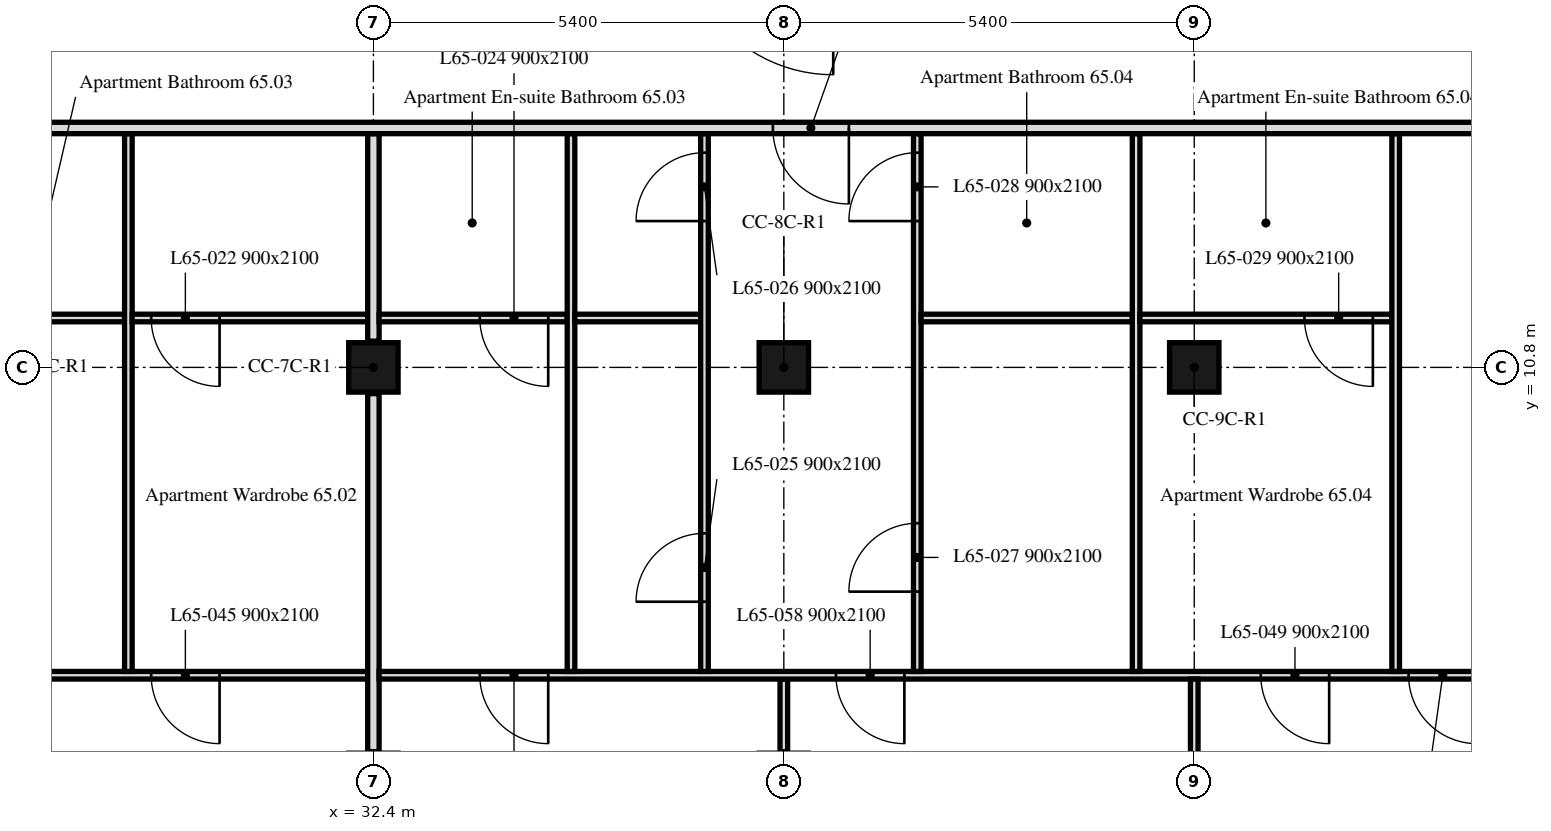
"""IFC4 building model, lengths in metres.
Left out: names, types, materials, properties, quantities, classifications, styles, units other than length and angle.
Written with IfcOpenShell. Run it as: python <this file> out.ifc"""

import sys

from ifc_helpers import new_model, si_unit, direction, frame, frame_2d, origin, origin_2d, place, context, subcontext, project, spatial, rectangle, extrude, element, fill, save


model = new_model("IFC4")
c1 = context("Model", 3, precision=1e-05, world=origin(), true_north=direction((0.0, 1.0)))
c2 = subcontext(c1, "Body", "Model", "MODEL_VIEW")
j1 = project(units=[si_unit("LENGTHUNIT", "METRE"), si_unit("PLANEANGLEUNIT", "RADIAN")], contexts=[c1])
p1 = place(None, origin())
s1 = spatial("IfcSite", under=j1, at=p1, CompositionType="ELEMENT")
p2 = place(p1, origin())
s2 = spatial("IfcBuilding", under=s1, at=p2, CompositionType="ELEMENT")
p3 = place(p2, frame((0.0, 0.0, 268.6)))
s3 = spatial("IfcBuildingStorey", under=s2, at=p3, CompositionType="ELEMENT", Elevation=268.6)
for number, where, z_axis, x_axis in (
    (1, (32.4, 10.8, 0.0), (0.0, 0.0, 1.0), (1.0, 0.0, 0.0)),
    (2, (37.8, 10.8, 0.0), (0.0, 0.0, 1.0), (1.0, 0.0, 0.0)),
    (3, (43.2, 10.8, 0.0), (0.0, 0.0, 1.0), (1.0, 0.0, 0.0)),
):
    element("IfcColumn", number, at=place(p3, frame(where, z_axis=z_axis, x_axis=x_axis)), inside=s3, PredefinedType="COLUMN", context=c2, shape_type="SweptSolid", body=[
        extrude(rectangle(XDim=0.65, YDim=0.65, at=origin_2d()), origin(), (0.0, 0.0, 1.0), 3.0),
    ])
p4 = place(p3, frame((32.325, 6.75, 0.0), z_axis=(0.0, 0.0, 1.0), x_axis=(-1.0, 0.0, 0.0)))
e4 = element("IfcWall", 4, at=p4, inside=s3, PredefinedType="PARTITIONING", context=c2, shape_type="SweptSolid", body=[
    extrude(rectangle(XDim=5.355, YDim=0.1, at=frame_2d((2.677, 0.0))), origin(), (0.0, 0.0, 1.0), 3.0),
])
p5 = place(p4, frame((1.949, 0.0, 0.0)))
e5 = element("IfcOpeningElement", 5, at=p5, cuts=e4, PredefinedType="OPENING", context=c2, shape_type="SweptSolid", body=[
    extrude(rectangle(XDim=0.9, YDim=2.1, at=frame_2d((0.45, 1.05))), frame((0.0, 0.05, 0.0), z_axis=(0.0, -1.0, 0.0), x_axis=(1.0, 0.0, 0.0)), (0.0, 0.0, 1.0), 0.1),
])
p6 = place(p3, frame((29.126, 11.45, 0.0), z_axis=(0.0, 0.0, 1.0), x_axis=(-1.0, 0.0, 0.0)))
e6 = element("IfcWall", 6, at=p6, inside=s3, PredefinedType="PARTITIONING", context=c2, shape_type="SweptSolid", body=[
    extrude(rectangle(XDim=2.056, YDim=0.1, at=frame_2d((1.028, 0.0))), origin(), (0.0, 0.0, 1.0), 3.0),
])
p7 = place(p3, frame((29.176, 6.8, 0.0), z_axis=(0.0, 0.0, 1.0), x_axis=(0.0, 1.0, 0.0)))
e7 = element("IfcWall", 7, at=p7, inside=s3, PredefinedType="PARTITIONING", context=c2, shape_type="SweptSolid", body=[
    extrude(rectangle(XDim=7.075, YDim=0.1, at=frame_2d((3.538, 0.0))), origin(), (0.0, 0.0, 1.0), 3.0),
])
p8 = place(p3, frame((32.4, 5.745, 0.0), z_axis=(0.0, 0.0, 1.0), x_axis=(0.0, 1.0, 0.0)))
e8 = element("IfcWall", 8, at=p8, inside=s3, PredefinedType="PARTITIONING", context=c2, shape_type="SweptSolid", body=[
    extrude(rectangle(XDim=4.71, YDim=0.15, at=frame_2d((2.355, 0.0))), origin(), (0.0, 0.0, 1.0), 2.4),
])
p9 = place(p3, frame((32.325, 11.45, 0.0), z_axis=(0.0, 0.0, 1.0), x_axis=(-1.0, 0.0, 0.0)))
e9 = element("IfcWall", 9, at=p9, inside=s3, PredefinedType="PARTITIONING", context=c2, shape_type="SweptSolid", body=[
    extrude(rectangle(XDim=3.099, YDim=0.1, at=frame_2d((1.549, 0.0))), origin(), (0.0, 0.0, 1.0), 3.0),
])
p10 = place(p9, frame((1.949, 0.0, 0.0)))
e10 = element("IfcOpeningElement", 10, at=p10, cuts=e9, PredefinedType="OPENING", context=c2, shape_type="SweptSolid", body=[
    extrude(rectangle(XDim=0.9, YDim=2.1, at=frame_2d((0.45, 1.05))), frame((0.0, 0.05, 0.0), z_axis=(0.0, -1.0, 0.0), x_axis=(1.0, 0.0, 0.0)), (0.0, 0.0, 1.0), 0.1),
])
p11 = place(p3, frame((32.4, 11.145, 0.0), z_axis=(0.0, 0.0, 1.0), x_axis=(0.0, 1.0, 0.0)))
e11 = element("IfcWall", 11, at=p11, inside=s3, PredefinedType="PARTITIONING", context=c2, shape_type="SweptSolid", body=[
    extrude(rectangle(XDim=2.73, YDim=0.15, at=frame_2d((1.365, 0.0))), origin(), (0.0, 0.0, 1.0), 2.4),
])
p12 = place(p3, frame((37.8, 5.745, 0.0), z_axis=(0.0, 0.0, 1.0), x_axis=(0.0, 1.0, 0.0)))
e12 = element("IfcWall", 12, at=p12, inside=s3, PredefinedType="PARTITIONING", context=c2, shape_type="SweptSolid", body=[
    extrude(rectangle(XDim=0.955, YDim=0.1, at=frame_2d((0.478, 0.0))), origin(), (0.0, 0.0, 1.0), 2.4),
])
p13 = place(p3, frame((47.849, 6.75, 0.0), z_axis=(0.0, 0.0, 1.0), x_axis=(-1.0, 0.0, 0.0)))
e13 = element("IfcWall", 13, at=p13, inside=s3, PredefinedType="PARTITIONING", context=c2, shape_type="SweptSolid", body=[
    extrude(rectangle(XDim=15.374, YDim=0.1, at=frame_2d((7.687, 0.0))), origin(), (0.0, 0.0, 1.0), 2.4),
])
p14 = place(p13, frame((0.929, 0.0, 0.0)))
e14 = element("IfcOpeningElement", 14, at=p14, cuts=e13, PredefinedType="OPENING", context=c2, shape_type="SweptSolid", body=[
    extrude(rectangle(XDim=0.9, YDim=2.1, at=frame_2d((0.45, 1.05))), frame((0.0, 0.05, 0.0), z_axis=(0.0, -1.0, 0.0), x_axis=(1.0, 0.0, 0.0)), (0.0, 0.0, 1.0), 0.1),
])
p15 = place(p13, frame((13.149, 0.0, 0.0)))
e15 = element("IfcOpeningElement", 15, at=p15, cuts=e13, PredefinedType="OPENING", context=c2, shape_type="SweptSolid", body=[
    extrude(rectangle(XDim=0.9, YDim=2.1, at=frame_2d((0.45, 1.05))), frame((0.0, 0.05, 0.0), z_axis=(0.0, -1.0, 0.0), x_axis=(1.0, 0.0, 0.0)), (0.0, 0.0, 1.0), 0.1),
])
p16 = place(p13, frame((2.874, 0.0, 0.0)))
e16 = element("IfcOpeningElement", 16, at=p16, cuts=e13, PredefinedType="OPENING", context=c2, shape_type="SweptSolid", body=[
    extrude(rectangle(XDim=0.9, YDim=2.1, at=frame_2d((0.45, 1.05))), frame((0.0, 0.05, 0.0), z_axis=(0.0, -1.0, 0.0), x_axis=(1.0, 0.0, 0.0)), (0.0, 0.0, 1.0), 0.1),
])
p17 = place(p13, frame((8.463, 0.0, 0.0)))
e17 = element("IfcOpeningElement", 17, at=p17, cuts=e13, PredefinedType="OPENING", context=c2, shape_type="SweptSolid", body=[
    extrude(rectangle(XDim=0.9, YDim=2.1, at=frame_2d((0.45, 1.05))), frame((0.0, 0.05, 0.0), z_axis=(0.0, -1.0, 0.0), x_axis=(1.0, 0.0, 0.0)), (0.0, 0.0, 1.0), 0.1),
])
p18 = place(p3, frame((43.2, 1.112, 0.0), z_axis=(0.0, 0.0, 1.0), x_axis=(0.0, 1.0, 0.0)))
e18 = element("IfcWall", 18, at=p18, inside=s3, PredefinedType="PARTITIONING", context=c2, shape_type="SweptSolid", body=[
    extrude(rectangle(XDim=5.588, YDim=0.1, at=frame_2d((2.794, 0.0))), origin(), (0.0, 0.0, 1.0), 3.0),
])
p19 = place(p18, frame((1.813, 0.0, 0.0)))
e19 = element("IfcOpeningElement", 19, at=p19, cuts=e18, PredefinedType="OPENING", context=c2, shape_type="SweptSolid", body=[
    extrude(rectangle(XDim=0.9, YDim=2.1, at=frame_2d((0.45, 1.05))), frame((0.0, 0.05, 0.0), z_axis=(0.0, -1.0, 0.0), x_axis=(1.0, 0.0, 0.0)), (0.0, 0.0, 1.0), 0.1),
])
p20 = place(p3, frame((34.95, 11.45, 0.0), z_axis=(0.0, 0.0, 1.0), x_axis=(-1.0, 0.0, 0.0)))
e20 = element("IfcWall", 20, at=p20, inside=s3, PredefinedType="PARTITIONING", context=c2, shape_type="SweptSolid", body=[
    extrude(rectangle(XDim=2.475, YDim=0.1, at=frame_2d((1.237, 0.0))), origin(), (0.0, 0.0, 1.0), 3.0),
])
p21 = place(p20, frame((0.25, 0.0, 0.0)))
e21 = element("IfcOpeningElement", 21, at=p21, cuts=e20, PredefinedType="OPENING", context=c2, shape_type="SweptSolid", body=[
    extrude(rectangle(XDim=0.9, YDim=2.1, at=frame_2d((0.45, 1.05))), frame((0.0, 0.05, 0.0), z_axis=(0.0, -1.0, 0.0), x_axis=(1.0, 0.0, 0.0)), (0.0, 0.0, 1.0), 0.1),
])
p22 = place(p3, frame((35.0, 6.8, 0.0), z_axis=(0.0, 0.0, 1.0), x_axis=(0.0, 1.0, 0.0)))
e22 = element("IfcWall", 22, at=p22, inside=s3, PredefinedType="PARTITIONING", context=c2, shape_type="SweptSolid", body=[
    extrude(rectangle(XDim=7.075, YDim=0.1, at=frame_2d((3.538, 0.0))), origin(), (0.0, 0.0, 1.0), 2.4),
])
p23 = place(p3, frame((36.706, 11.45, 0.0), z_axis=(0.0, 0.0, 1.0), x_axis=(-1.0, 0.0, 0.0)))
e23 = element("IfcWall", 23, at=p23, inside=s3, PredefinedType="PARTITIONING", context=c2, shape_type="SweptSolid", body=[
    extrude(rectangle(XDim=1.656, YDim=0.1, at=frame_2d((0.828, 0.0))), origin(), (0.0, 0.0, 1.0), 3.0),
])
p24 = place(p3, frame((36.756, 6.8, 0.0), z_axis=(0.0, 0.0, 1.0), x_axis=(0.0, 1.0, 0.0)))
e24 = element("IfcWall", 24, at=p24, inside=s3, PredefinedType="PARTITIONING", context=c2, shape_type="SweptSolid", body=[
    extrude(rectangle(XDim=7.075, YDim=0.1, at=frame_2d((3.538, 0.0))), origin(), (0.0, 0.0, 1.0), 2.4),
])
p25 = place(p24, frame((0.917, 0.0, 0.0)))
e25 = element("IfcOpeningElement", 25, at=p25, cuts=e24, PredefinedType="OPENING", context=c2, shape_type="SweptSolid", body=[
    extrude(rectangle(XDim=0.9, YDim=2.1, at=frame_2d((0.45, 1.05))), frame((0.0, 0.05, 0.0), z_axis=(0.0, -1.0, 0.0), x_axis=(1.0, 0.0, 0.0)), (0.0, 0.0, 1.0), 0.1),
])
p26 = place(p24, frame((5.925, 0.0, 0.0)))
e26 = element("IfcOpeningElement", 26, at=p26, cuts=e24, PredefinedType="OPENING", context=c2, shape_type="SweptSolid", body=[
    extrude(rectangle(XDim=0.9, YDim=2.1, at=frame_2d((0.45, 1.05))), frame((0.0, 0.05, 0.0), z_axis=(0.0, -1.0, 0.0), x_axis=(1.0, 0.0, 0.0)), (0.0, 0.0, 1.0), 0.1),
])
p27 = place(p3, frame((39.556, 6.8, 0.0), z_axis=(0.0, 0.0, 1.0), x_axis=(0.0, 1.0, 0.0)))
e27 = element("IfcWall", 27, at=p27, inside=s3, PredefinedType="PARTITIONING", context=c2, shape_type="SweptSolid", body=[
    extrude(rectangle(XDim=7.075, YDim=0.1, at=frame_2d((3.538, 0.0))), origin(), (0.0, 0.0, 1.0), 2.4),
])
p28 = place(p27, frame((1.05, 0.0, 0.0)))
e28 = element("IfcOpeningElement", 28, at=p28, cuts=e27, PredefinedType="OPENING", context=c2, shape_type="SweptSolid", body=[
    extrude(rectangle(XDim=0.9, YDim=2.1, at=frame_2d((0.45, 1.05))), frame((0.0, 0.05, 0.0), z_axis=(0.0, -1.0, 0.0), x_axis=(1.0, 0.0, 0.0)), (0.0, 0.0, 1.0), 0.1),
])
p29 = place(p27, frame((5.925, 0.0, 0.0)))
e29 = element("IfcOpeningElement", 29, at=p29, cuts=e27, PredefinedType="OPENING", context=c2, shape_type="SweptSolid", body=[
    extrude(rectangle(XDim=0.9, YDim=2.1, at=frame_2d((0.45, 1.05))), frame((0.0, 0.05, 0.0), z_axis=(0.0, -1.0, 0.0), x_axis=(1.0, 0.0, 0.0)), (0.0, 0.0, 1.0), 0.1),
])
p30 = place(p3, frame((42.385, 11.45, 0.0), z_axis=(0.0, 0.0, 1.0), x_axis=(-1.0, 0.0, 0.0)))
e30 = element("IfcWall", 30, at=p30, inside=s3, PredefinedType="PARTITIONING", context=c2, shape_type="SweptSolid", body=[
    extrude(rectangle(XDim=2.779, YDim=0.1, at=frame_2d((1.39, 0.0))), origin(), (0.0, 0.0, 1.0), 3.0),
])
p31 = place(p3, frame((42.435, 6.8, 0.0), z_axis=(0.0, 0.0, 1.0), x_axis=(0.0, 1.0, 0.0)))
e31 = element("IfcWall", 31, at=p31, inside=s3, PredefinedType="PARTITIONING", context=c2, shape_type="SweptSolid", body=[
    extrude(rectangle(XDim=7.075, YDim=0.1, at=frame_2d((3.538, 0.0))), origin(), (0.0, 0.0, 1.0), 2.4),
])
p32 = place(p3, frame((45.8, 11.45, 0.0), z_axis=(0.0, 0.0, 1.0), x_axis=(-1.0, 0.0, 0.0)))
e32 = element("IfcWall", 32, at=p32, inside=s3, PredefinedType="PARTITIONING", context=c2, shape_type="SweptSolid", body=[
    extrude(rectangle(XDim=3.315, YDim=0.1, at=frame_2d((1.657, 0.0))), origin(), (0.0, 0.0, 1.0), 3.0),
])
p33 = place(p32, frame((0.25, 0.0, 0.0)))
e33 = element("IfcOpeningElement", 33, at=p33, cuts=e32, PredefinedType="OPENING", context=c2, shape_type="SweptSolid", body=[
    extrude(rectangle(XDim=0.9, YDim=2.1, at=frame_2d((0.45, 1.05))), frame((0.0, 0.05, 0.0), z_axis=(0.0, -1.0, 0.0), x_axis=(1.0, 0.0, 0.0)), (0.0, 0.0, 1.0), 0.1),
])
p34 = place(p3, frame((45.85, 6.8, 0.0), z_axis=(0.0, 0.0, 1.0), x_axis=(0.0, 1.0, 0.0)))
e34 = element("IfcWall", 34, at=p34, inside=s3, PredefinedType="PARTITIONING", context=c2, shape_type="SweptSolid", body=[
    extrude(rectangle(XDim=7.075, YDim=0.1, at=frame_2d((3.538, 0.0))), origin(), (0.0, 0.0, 1.0), 2.4),
])
p35 = place(p3, frame((47.849, 13.95, 0.0), z_axis=(0.0, 0.0, 1.0), x_axis=(-1.0, 0.0, 0.0)))
e35 = element("IfcWall", 35, at=p35, inside=s3, PredefinedType="PARTITIONING", context=c2, shape_type="SweptSolid", body=[
    extrude(rectangle(XDim=41.698, YDim=0.15, at=frame_2d((20.849, 0.0))), origin(), (0.0, 0.0, 1.0), 2.4),
])
p36 = place(p35, frame((37.749, 0.0, 0.0)))
e36 = element("IfcOpeningElement", 36, at=p36, cuts=e35, PredefinedType="OPENING", context=c2, shape_type="SweptSolid", body=[
    extrude(rectangle(XDim=1.0, YDim=2.1, at=frame_2d((0.5, 1.05))), frame((0.0, 0.075, 0.0), z_axis=(0.0, -1.0, 0.0), x_axis=(1.0, 0.0, 0.0)), (0.0, 0.0, 1.0), 0.15),
])
p37 = place(p35, frame((32.962, 0.0, 0.0)))
e37 = element("IfcOpeningElement", 37, at=p37, cuts=e35, PredefinedType="OPENING", context=c2, shape_type="SweptSolid", body=[
    extrude(rectangle(XDim=1.0, YDim=2.1, at=frame_2d((0.5, 1.05))), frame((0.0, 0.075, 0.0), z_axis=(0.0, -1.0, 0.0), x_axis=(1.0, 0.0, 0.0)), (0.0, 0.0, 1.0), 0.15),
])
p38 = place(p35, frame((22.179, 0.0, 0.0)))
e38 = element("IfcOpeningElement", 38, at=p38, cuts=e35, PredefinedType="OPENING", context=c2, shape_type="SweptSolid", body=[
    extrude(rectangle(XDim=1.0, YDim=2.1, at=frame_2d((0.5, 1.05))), frame((0.0, 0.075, 0.0), z_axis=(0.0, -1.0, 0.0), x_axis=(1.0, 0.0, 0.0)), (0.0, 0.0, 1.0), 0.15),
])
p39 = place(p35, frame((9.193, 0.0, 0.0)))
e39 = element("IfcOpeningElement", 39, at=p39, cuts=e35, PredefinedType="OPENING", context=c2, shape_type="SweptSolid", body=[
    extrude(rectangle(XDim=1.0, YDim=2.1, at=frame_2d((0.5, 1.05))), frame((0.0, 0.075, 0.0), z_axis=(0.0, -1.0, 0.0), x_axis=(1.0, 0.0, 0.0)), (0.0, 0.0, 1.0), 0.15),
])
p40 = place(p10, origin())
e40 = element("IfcDoor", 40, at=p40, inside=s3, OperationType="SINGLE_SWING_LEFT", PredefinedType="DOOR", context=c2, shape_type="SweptSolid", body=[
    extrude(rectangle(XDim=0.9, YDim=2.1, at=frame_2d((0.45, 1.05))), frame((0.0, 0.025, 0.0), z_axis=(0.0, -1.0, 0.0), x_axis=(1.0, 0.0, 0.0)), (0.0, 0.0, 1.0), 0.05),
])
fill(e10, e40)
p41 = place(p14, origin())
e41 = element("IfcDoor", 41, at=p41, inside=s3, OperationType="SINGLE_SWING_RIGHT", PredefinedType="DOOR", context=c2, shape_type="SweptSolid", body=[
    extrude(rectangle(XDim=0.9, YDim=2.1, at=frame_2d((0.45, 1.05))), frame((0.0, 0.025, 0.0), z_axis=(0.0, -1.0, 0.0), x_axis=(1.0, 0.0, 0.0)), (0.0, 0.0, 1.0), 0.05),
])
fill(e14, e41)
p42 = place(p21, origin())
e42 = element("IfcDoor", 42, at=p42, inside=s3, OperationType="SINGLE_SWING_LEFT", PredefinedType="DOOR", context=c2, shape_type="SweptSolid", body=[
    extrude(rectangle(XDim=0.9, YDim=2.1, at=frame_2d((0.45, 1.05))), frame((0.0, 0.025, 0.0), z_axis=(0.0, -1.0, 0.0), x_axis=(1.0, 0.0, 0.0)), (0.0, 0.0, 1.0), 0.05),
])
fill(e21, e42)
p43 = place(p25, origin())
e43 = element("IfcDoor", 43, at=p43, inside=s3, OperationType="SINGLE_SWING_RIGHT", PredefinedType="DOOR", context=c2, shape_type="SweptSolid", body=[
    extrude(rectangle(XDim=0.9, YDim=2.1, at=frame_2d((0.45, 1.05))), frame((0.0, 0.025, 0.0), z_axis=(0.0, -1.0, 0.0), x_axis=(1.0, 0.0, 0.0)), (0.0, 0.0, 1.0), 0.05),
])
fill(e25, e43)
p44 = place(p26, origin())
e44 = element("IfcDoor", 44, at=p44, inside=s3, OperationType="SINGLE_SWING_LEFT", PredefinedType="DOOR", context=c2, shape_type="SweptSolid", body=[
    extrude(rectangle(XDim=0.9, YDim=2.1, at=frame_2d((0.45, 1.05))), frame((0.0, 0.025, 0.0), z_axis=(0.0, -1.0, 0.0), x_axis=(1.0, 0.0, 0.0)), (0.0, 0.0, 1.0), 0.05),
])
fill(e26, e44)
p45 = place(p28, origin())
e45 = element("IfcDoor", 45, at=p45, inside=s3, OperationType="SINGLE_SWING_LEFT", PredefinedType="DOOR", context=c2, shape_type="SweptSolid", body=[
    extrude(rectangle(XDim=0.9, YDim=2.1, at=frame_2d((0.45, 1.05))), frame((0.0, 0.025, 0.0), z_axis=(0.0, -1.0, 0.0), x_axis=(1.0, 0.0, 0.0)), (0.0, 0.0, 1.0), 0.05),
])
fill(e28, e45)
p46 = place(p29, origin())
e46 = element("IfcDoor", 46, at=p46, inside=s3, OperationType="SINGLE_SWING_LEFT", PredefinedType="DOOR", context=c2, shape_type="SweptSolid", body=[
    extrude(rectangle(XDim=0.9, YDim=2.1, at=frame_2d((0.45, 1.05))), frame((0.0, 0.025, 0.0), z_axis=(0.0, -1.0, 0.0), x_axis=(1.0, 0.0, 0.0)), (0.0, 0.0, 1.0), 0.05),
])
fill(e29, e46)
p47 = place(p33, origin())
e47 = element("IfcDoor", 47, at=p47, inside=s3, OperationType="SINGLE_SWING_LEFT", PredefinedType="DOOR", context=c2, shape_type="SweptSolid", body=[
    extrude(rectangle(XDim=0.9, YDim=2.1, at=frame_2d((0.45, 1.05))), frame((0.0, 0.025, 0.0), z_axis=(0.0, -1.0, 0.0), x_axis=(1.0, 0.0, 0.0)), (0.0, 0.0, 1.0), 0.05),
])
fill(e33, e47)
p48 = place(p5, origin())
e48 = element("IfcDoor", 48, at=p48, inside=s3, OperationType="SINGLE_SWING_RIGHT", PredefinedType="DOOR", context=c2, shape_type="SweptSolid", body=[
    extrude(rectangle(XDim=0.9, YDim=2.1, at=frame_2d((0.45, 1.05))), frame((0.0, 0.025, 0.0), z_axis=(0.0, -1.0, 0.0), x_axis=(1.0, 0.0, 0.0)), (0.0, 0.0, 1.0), 0.05),
])
fill(e5, e48)
p49 = place(p15, origin())
e49 = element("IfcDoor", 49, at=p49, inside=s3, OperationType="SINGLE_SWING_RIGHT", PredefinedType="DOOR", context=c2, shape_type="SweptSolid", body=[
    extrude(rectangle(XDim=0.9, YDim=2.1, at=frame_2d((0.45, 1.05))), frame((0.0, 0.025, 0.0), z_axis=(0.0, -1.0, 0.0), x_axis=(1.0, 0.0, 0.0)), (0.0, 0.0, 1.0), 0.05),
])
fill(e15, e49)
p50 = place(p16, origin())
e50 = element("IfcDoor", 50, at=p50, inside=s3, OperationType="SINGLE_SWING_LEFT", PredefinedType="DOOR", context=c2, shape_type="SweptSolid", body=[
    extrude(rectangle(XDim=0.9, YDim=2.1, at=frame_2d((0.45, 1.05))), frame((0.0, 0.025, 0.0), z_axis=(0.0, -1.0, 0.0), x_axis=(1.0, 0.0, 0.0)), (0.0, 0.0, 1.0), 0.05),
])
fill(e16, e50)
p51 = place(p17, origin())
e51 = element("IfcDoor", 51, at=p51, inside=s3, OperationType="SINGLE_SWING_RIGHT", PredefinedType="DOOR", context=c2, shape_type="SweptSolid", body=[
    extrude(rectangle(XDim=0.9, YDim=2.1, at=frame_2d((0.45, 1.05))), frame((0.0, 0.025, 0.0), z_axis=(0.0, -1.0, 0.0), x_axis=(1.0, 0.0, 0.0)), (0.0, 0.0, 1.0), 0.05),
])
fill(e17, e51)
p52 = place(p39, origin())
e52 = element("IfcDoor", 52, at=p52, inside=s3, OperationType="SINGLE_SWING_LEFT", PredefinedType="DOOR", context=c2, shape_type="SweptSolid", body=[
    extrude(rectangle(XDim=1.0, YDim=2.1, at=frame_2d((0.5, 1.05))), frame((0.0, 0.025, 0.0), z_axis=(0.0, -1.0, 0.0), x_axis=(1.0, 0.0, 0.0)), (0.0, 0.0, 1.0), 0.05),
])
fill(e39, e52)
save(model, sys.argv[1])
